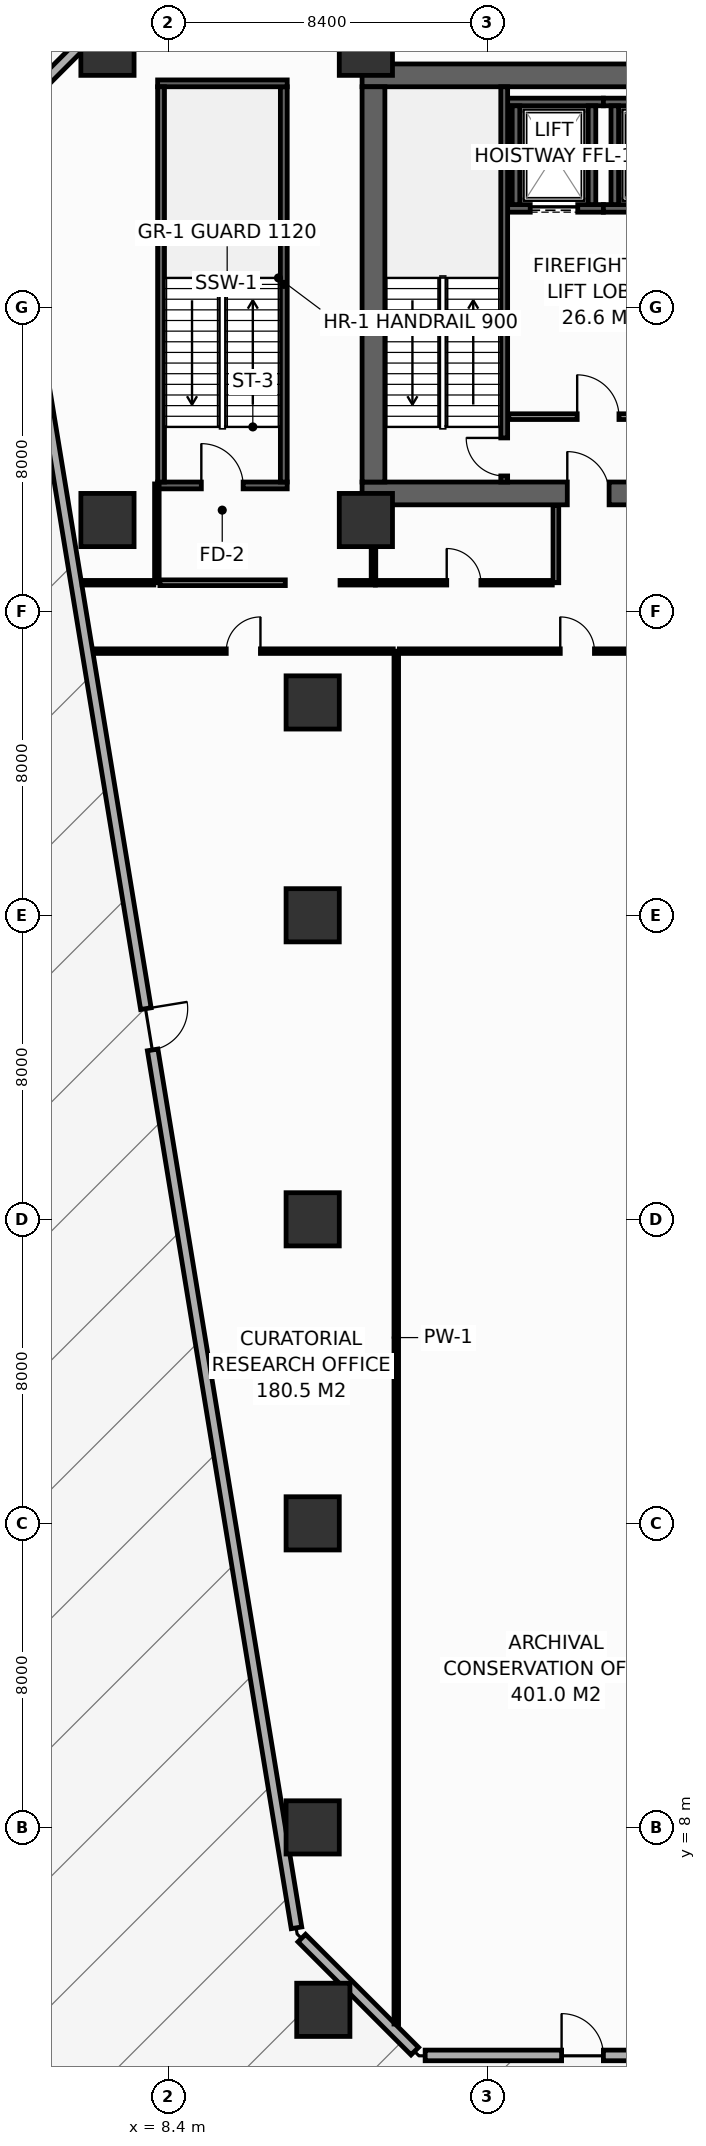
"""IFC4 building model, lengths in metres.
Left out: names, types, materials, properties, quantities, classifications, styles, units other than length and angle.
Written with IfcOpenShell. Run it as: python <this file> out.ifc"""

import sys

from ifc_helpers import new_model, si_unit, direction, frame, frame_2d, origin, origin_2d, place, context, subcontext, project, spatial, rectangle, hollow_rectangle, extrude, element, fill, save


model = new_model("IFC4")
c1 = context("Model", 3, precision=1e-05, world=origin(), true_north=direction((0.0, 1.0)))
c2 = subcontext(c1, "Body", "Model", "MODEL_VIEW")
j1 = project(units=[si_unit("LENGTHUNIT", "METRE"), si_unit("PLANEANGLEUNIT", "RADIAN")], contexts=[c1])
p1 = place(None, origin())
s1 = spatial("IfcSite", under=j1, at=p1, CompositionType="ELEMENT")
p2 = place(p1, origin())
s2 = spatial("IfcBuilding", under=s1, at=p2, CompositionType="ELEMENT")
p3 = place(p2, frame((0.0, 0.0, 27.6)))
s3 = spatial("IfcBuildingStorey", under=s2, at=p3, CompositionType="ELEMENT", Elevation=27.6)
p4 = place(p3, frame((13.5, 43.1, 0.0), z_axis=(0.0, 0.0, 1.0), x_axis=(1.0, 0.0, 0.0)))
e1 = element("IfcWall", 1, at=p4, inside=s3, PredefinedType="SHEAR", context=c2, shape_type="SweptSolid", body=[
    extrude(rectangle(XDim=32.9, YDim=0.6, at=frame_2d((16.45, 0.0))), origin(), (0.0, 0.0, 1.0), 5.15),
])
p5 = place(p4, frame((5.4, 0.0, 0.0)))
e2 = element("IfcOpeningElement", 2, at=p5, cuts=e1, PredefinedType="OPENING", context=c2, shape_type="SweptSolid", body=[
    extrude(rectangle(XDim=1.1, YDim=2.15, at=frame_2d((0.55, 1.075))), frame((0.0, 0.31, 0.0), z_axis=(0.0, -1.0, 0.0), x_axis=(1.0, 0.0, 0.0)), (0.0, 0.0, 1.0), 0.62),
])
p6 = place(p4, frame((25.6, 0.0, 0.0)))
e3 = element("IfcOpeningElement", 3, at=p6, cuts=e1, PredefinedType="OPENING", context=c2, shape_type="SweptSolid", body=[
    extrude(rectangle(XDim=1.1, YDim=2.15, at=frame_2d((0.55, 1.075))), frame((0.0, 0.31, 0.0), z_axis=(0.0, -1.0, 0.0), x_axis=(1.0, 0.0, 0.0)), (0.0, 0.0, 1.0), 0.62),
])
p7 = place(p3, frame((13.5, 54.1, 0.0), z_axis=(0.0, 0.0, 1.0), x_axis=(1.0, 0.0, 0.0)))
e4 = element("IfcWall", 4, at=p7, inside=s3, PredefinedType="SHEAR", context=c2, shape_type="SweptSolid", body=[
    extrude(rectangle(XDim=32.9, YDim=0.6, at=frame_2d((16.45, 0.0))), origin(), (0.0, 0.0, 1.0), 5.15),
])
p8 = place(p3, frame((13.8, 43.4, 0.0), z_axis=(0.0, 0.0, 1.0), x_axis=(0.0, 1.0, 0.0)))
e5 = element("IfcWall", 5, at=p8, inside=s3, PredefinedType="SHEAR", context=c2, shape_type="SweptSolid", body=[
    extrude(rectangle(XDim=10.4, YDim=0.6, at=frame_2d((5.2, 0.0))), origin(), (0.0, 0.0, 1.0), 5.15),
])
for number, where, z_axis, x_axis in (
    (6, (6.8, 54.8, 0.0), (0.0, 0.0, 1.0), (1.0, 0.0, 0.0)),
    (7, (13.6, 54.8, 0.0), (0.0, 0.0, 1.0), (1.0, 0.0, 0.0)),
    (8, (6.8, 42.4, 0.0), (0.0, 0.0, 1.0), (1.0, 0.0, 0.0)),
    (9, (13.6, 42.4, 0.0), (0.0, 0.0, 1.0), (1.0, 0.0, 0.0)),
    (10, (12.48, 3.2, 0.0), (0.0, 0.0, 1.0), (1.0, 0.0, 0.0)),
    (11, (12.2, 8.0, 0.0), (0.0, 0.0, 1.0), (1.0, 0.0, 0.0)),
    (12, (12.2, 16.0, 0.0), (0.0, 0.0, 1.0), (1.0, 0.0, 0.0)),
    (13, (12.2, 24.0, 0.0), (0.0, 0.0, 1.0), (1.0, 0.0, 0.0)),
    (14, (12.2, 32.0, 0.0), (0.0, 0.0, 1.0), (1.0, 0.0, 0.0)),
    (15, (12.2, 37.6, 0.0), (0.0, 0.0, 1.0), (1.0, 0.0, 0.0)),
):
    element("IfcColumn", number, at=place(p3, frame(where, z_axis=z_axis, x_axis=x_axis)), inside=s3, PredefinedType="COLUMN", context=c2, shape_type="SweptSolid", body=[
        extrude(hollow_rectangle(XDim=1.4, YDim=1.4, WallThickness=0.065, at=origin_2d()), origin(), (0.0, 0.0, 1.0), 5.4),
    ])
p9 = place(p3, frame((17.33, 50.6, 0.0), z_axis=(0.0, 0.0, 1.0), x_axis=(1.0, 0.0, 0.0)))
e16 = element("IfcWall", 16, at=p9, inside=s3, PredefinedType="SHEAR", context=c2, shape_type="SweptSolid", body=[
    extrude(rectangle(XDim=2.52, YDim=0.2, at=frame_2d((1.26, 0.0))), origin(), (0.0, 0.0, 1.0), 5.15),
])
p10 = place(p9, frame((0.595, 0.0, 0.0)))
e17 = element("IfcOpeningElement", 17, at=p10, cuts=e16, PredefinedType="OPENING", context=c2, shape_type="SweptSolid", body=[
    extrude(rectangle(XDim=1.25, YDim=2.3, at=frame_2d((0.625, 1.15))), frame((0.0, 0.11, 0.0), z_axis=(0.0, -1.0, 0.0), x_axis=(1.0, 0.0, 0.0)), (0.0, 0.0, 1.0), 0.22),
])
p11 = place(p3, frame((17.33, 53.4, 0.0), z_axis=(0.0, 0.0, 1.0), x_axis=(1.0, 0.0, 0.0)))
e18 = element("IfcWall", 18, at=p11, inside=s3, PredefinedType="SHEAR", context=c2, shape_type="SweptSolid", body=[
    extrude(rectangle(XDim=2.52, YDim=0.2, at=frame_2d((1.26, 0.0))), origin(), (0.0, 0.0, 1.0), 5.15),
])
for number, where, z_axis, x_axis in (
    (19, (17.55, 50.7, 0.0), (0.0, 0.0, 1.0), (0.0, 1.0, 0.0)),
    (20, (19.55, 50.7, 0.0), (0.0, 0.0, 1.0), (0.0, 1.0, 0.0)),
):
    element("IfcWall", number, at=place(p3, frame(where, z_axis=z_axis, x_axis=x_axis)), inside=s3, PredefinedType="SHEAR", context=c2, shape_type="SweptSolid", body=[
        extrude(rectangle(XDim=2.6, YDim=0.2, at=frame_2d((1.3, 0.0))), origin(), (0.0, 0.0, 1.0), 5.15),
    ])
p12 = place(p3, frame((19.85, 50.6, 0.0), z_axis=(0.0, 0.0, 1.0), x_axis=(1.0, 0.0, 0.0)))
e21 = element("IfcWall", 21, at=p12, inside=s3, PredefinedType="SHEAR", context=c2, shape_type="SweptSolid", body=[
    extrude(rectangle(XDim=2.65, YDim=0.2, at=frame_2d((1.325, 0.0))), origin(), (0.0, 0.0, 1.0), 5.15),
])
p13 = place(p12, frame((0.675, 0.0, 0.0)))
e22 = element("IfcOpeningElement", 22, at=p13, cuts=e21, PredefinedType="OPENING", context=c2, shape_type="SweptSolid", body=[
    extrude(rectangle(XDim=1.25, YDim=2.3, at=frame_2d((0.625, 1.15))), frame((0.0, 0.11, 0.0), z_axis=(0.0, -1.0, 0.0), x_axis=(1.0, 0.0, 0.0)), (0.0, 0.0, 1.0), 0.22),
])
p14 = place(p3, frame((19.85, 53.4, 0.0), z_axis=(0.0, 0.0, 1.0), x_axis=(1.0, 0.0, 0.0)))
e23 = element("IfcWall", 23, at=p14, inside=s3, PredefinedType="SHEAR", context=c2, shape_type="SweptSolid", body=[
    extrude(rectangle(XDim=2.65, YDim=0.2, at=frame_2d((1.325, 0.0))), origin(), (0.0, 0.0, 1.0), 5.15),
])
p15 = place(p3, frame((20.15, 50.7, 0.0), z_axis=(0.0, 0.0, 1.0), x_axis=(0.0, 1.0, 0.0)))
e24 = element("IfcWall", 24, at=p15, inside=s3, PredefinedType="SHEAR", context=c2, shape_type="SweptSolid", body=[
    extrude(rectangle(XDim=2.6, YDim=0.2, at=frame_2d((1.3, 0.0))), origin(), (0.0, 0.0, 1.0), 5.15),
])
p16 = place(p3, frame((17.24, 43.4, 0.0), z_axis=(0.0, 0.0, 1.0), x_axis=(0.0, 1.0, 0.0)))
e25 = element("IfcWall", 25, at=p16, inside=s3, PredefinedType="SHEAR", context=c2, shape_type="SweptSolid", body=[
    extrude(rectangle(XDim=10.4, YDim=0.18, at=frame_2d((5.2, 0.0))), origin(), (0.0, 0.0, 1.0), 5.15),
])
p17 = place(p16, frame((0.16, 0.0, 0.0)))
e26 = element("IfcOpeningElement", 26, at=p17, cuts=e25, PredefinedType="OPENING", context=c2, shape_type="SweptSolid", body=[
    extrude(rectangle(XDim=1.0, YDim=2.15, at=frame_2d((0.5, 1.075))), frame((0.0, 0.1, 0.0), z_axis=(0.0, -1.0, 0.0), x_axis=(1.0, 0.0, 0.0)), (0.0, 0.0, 1.0), 0.2),
])
p18 = place(p3, frame((8.12, 43.31, 0.0), z_axis=(0.0, 0.0, 1.0), x_axis=(1.0, 0.0, 0.0)))
e27 = element("IfcWall", 27, at=p18, inside=s3, PredefinedType="SHEAR", context=c2, shape_type="SweptSolid", body=[
    extrude(rectangle(XDim=3.41, YDim=0.18, at=frame_2d((1.705, 0.0))), origin(), (0.0, 0.0, 1.0), 5.15),
])
p19 = place(p18, frame((1.15, 0.0, 0.0)))
e28 = element("IfcOpeningElement", 28, at=p19, cuts=e27, PredefinedType="OPENING", context=c2, shape_type="SweptSolid", body=[
    extrude(rectangle(XDim=1.1, YDim=2.15, at=frame_2d((0.55, 1.075))), frame((0.0, 0.1, 0.0), z_axis=(0.0, -1.0, 0.0), x_axis=(1.0, 0.0, 0.0)), (0.0, 0.0, 1.0), 0.2),
])
p20 = place(p3, frame((11.44, 43.4, 0.0), z_axis=(0.0, 0.0, 1.0), x_axis=(0.0, 1.0, 0.0)))
e29 = element("IfcWall", 29, at=p20, inside=s3, PredefinedType="SHEAR", context=c2, shape_type="SweptSolid", body=[
    extrude(rectangle(XDim=10.4, YDim=0.18, at=frame_2d((5.2, 0.0))), origin(), (0.0, 0.0, 1.0), 5.15),
])
p21 = place(p3, frame((11.53, 53.89, 0.0), z_axis=(0.0, 0.0, 1.0), x_axis=(-1.0, 0.0, 0.0)))
e30 = element("IfcWall", 30, at=p21, inside=s3, PredefinedType="SHEAR", context=c2, shape_type="SweptSolid", body=[
    extrude(rectangle(XDim=3.41, YDim=0.18, at=frame_2d((1.705, 0.0))), origin(), (0.0, 0.0, 1.0), 5.15),
])
p22 = place(p3, frame((8.21, 53.8, 0.0), z_axis=(0.0, 0.0, 1.0), x_axis=(0.0, -1.0, 0.0)))
e31 = element("IfcWall", 31, at=p22, inside=s3, PredefinedType="SHEAR", context=c2, shape_type="SweptSolid", body=[
    extrude(rectangle(XDim=10.4, YDim=0.18, at=frame_2d((5.2, 0.0))), origin(), (0.0, 0.0, 1.0), 5.15),
])
p23 = place(p3, frame((17.36, 45.12, 0.0), z_axis=(0.0, 0.0, 1.0), x_axis=(1.0, 0.0, 0.0)))
e32 = element("IfcWall", 32, at=p23, inside=s3, PredefinedType="PARTITIONING", context=c2, shape_type="SweptSolid", body=[
    extrude(rectangle(XDim=5.14, YDim=0.15, at=frame_2d((2.57, 0.0))), origin(), (0.0, 0.0, 1.0), 5.15),
])
p24 = place(p23, frame((1.8, 0.0, 0.0)))
e33 = element("IfcOpeningElement", 33, at=p24, cuts=e32, PredefinedType="OPENING", context=c2, shape_type="SweptSolid", body=[
    extrude(rectangle(XDim=1.1, YDim=2.15, at=frame_2d((0.55, 1.075))), frame((0.0, 0.085, 0.0), z_axis=(0.0, -1.0, 0.0), x_axis=(1.0, 0.0, 0.0)), (0.0, 0.0, 1.0), 0.17),
])
p25 = place(p3, frame((11.913, 5.087, 0.0), z_axis=(0.0, 0.0, 1.0), x_axis=(0.707106781187, -0.707106781187, 0.0)))
e34 = element("IfcWall", 34, at=p25, inside=s3, PredefinedType="STANDARD", context=c2, shape_type="SweptSolid", body=[
    extrude(rectangle(XDim=4.206, YDim=0.28, at=frame_2d((2.103, 0.0))), origin(), (0.0, 0.0, 1.0), 5.15),
])
p26 = place(p3, frame((15.16, 2.0, 0.0), z_axis=(0.0, 0.0, 1.0), x_axis=(1.0, 0.0, 0.0)))
e35 = element("IfcWall", 35, at=p26, inside=s3, PredefinedType="STANDARD", context=c2, shape_type="SweptSolid", body=[
    extrude(rectangle(XDim=8.28, YDim=0.28, at=frame_2d((4.14, 0.0))), origin(), (0.0, 0.0, 1.0), 5.15),
])
p27 = place(p26, frame((3.59, 0.0, 0.0)))
e36 = element("IfcOpeningElement", 36, at=p27, cuts=e35, PredefinedType="OPENING", context=c2, shape_type="SweptSolid", body=[
    extrude(rectangle(XDim=1.1, YDim=2.2, at=frame_2d((0.55, 1.1))), frame((0.0, 0.15, 0.0), z_axis=(0.0, -1.0, 0.0), x_axis=(1.0, 0.0, 0.0)), (0.0, 0.0, 1.0), 0.3),
])
p28 = place(p3, frame((7.087, 55.887, 0.0), z_axis=(0.0, 0.0, 1.0), x_axis=(-0.707106781187, -0.707106781187, 0.0)))
e37 = element("IfcWall", 37, at=p28, inside=s3, PredefinedType="STANDARD", context=c2, shape_type="SweptSolid", body=[
    extrude(rectangle(XDim=4.206, YDim=0.28, at=frame_2d((2.103, 0.0))), origin(), (0.0, 0.0, 1.0), 5.15),
])
p29 = place(p3, frame((4.026, 52.642, 0.0), z_axis=(0.0, 0.0, 1.0), x_axis=(0.161709707857, -0.986838370953, 0.0)))
e38 = element("IfcWall", 38, at=p29, inside=s3, PredefinedType="STANDARD", context=c2, shape_type="SweptSolid", body=[
    extrude(rectangle(XDim=47.915, YDim=0.28, at=frame_2d((23.958, 0.0))), origin(), (0.0, 0.0, 1.0), 5.15),
])
p30 = place(p29, frame((23.407, 0.0, 0.0)))
e39 = element("IfcOpeningElement", 39, at=p30, cuts=e38, PredefinedType="OPENING", context=c2, shape_type="SweptSolid", body=[
    extrude(rectangle(XDim=1.1, YDim=2.2, at=frame_2d((0.55, 1.1))), frame((0.0, 0.15, 0.0), z_axis=(0.0, -1.0, 0.0), x_axis=(1.0, 0.0, 0.0)), (0.0, 0.0, 1.0), 0.3),
])
p31 = place(p3, frame((12.92, 40.75, 0.0), z_axis=(0.0, 0.0, 1.0), x_axis=(1.0, 0.0, 0.0)))
e40 = element("IfcWall", 40, at=p31, inside=s3, PredefinedType="PARTITIONING", context=c2, shape_type="SweptSolid", body=[
    extrude(rectangle(XDim=0.93, YDim=0.12, at=frame_2d((0.465, 0.0))), origin(), (0.0, 0.0, 1.0), 5.15),
])
p32 = place(p3, frame((13.8, 40.83, 0.0), z_axis=(0.0, 0.0, 1.0), x_axis=(0.0, 1.0, 0.0)))
e41 = element("IfcWall", 41, at=p32, inside=s3, PredefinedType="PARTITIONING", context=c2, shape_type="SweptSolid", body=[
    extrude(rectangle(XDim=1.95, YDim=0.12, at=frame_2d((0.975, 0.0))), origin(), (0.0, 0.0, 1.0), 5.15),
])
p33 = place(p3, frame((8.1, 40.75, 0.0), z_axis=(0.0, 0.0, 1.0), x_axis=(0.0, 1.0, 0.0)))
e42 = element("IfcWall", 42, at=p33, inside=s3, PredefinedType="PARTITIONING", context=c2, shape_type="SweptSolid", body=[
    extrude(rectangle(XDim=2.6, YDim=0.12, at=frame_2d((1.3, 0.0))), origin(), (0.0, 0.0, 1.0), 4.235),
])
p34 = place(p3, frame((8.18, 40.75, 0.0), z_axis=(0.0, 0.0, 1.0), x_axis=(1.0, 0.0, 0.0)))
e43 = element("IfcWall", 43, at=p34, inside=s3, PredefinedType="PARTITIONING", context=c2, shape_type="SweptSolid", body=[
    extrude(rectangle(XDim=3.3, YDim=0.15, at=frame_2d((1.65, 0.0))), origin(), (0.0, 0.0, 1.0), 4.235),
])
p35 = place(p3, frame((6.137, 40.75, 0.0), z_axis=(0.0, 0.0, 1.0), x_axis=(1.0, 0.0, 0.0)))
e44 = element("IfcWall", 44, at=p35, inside=s3, PredefinedType="PARTITIONING", context=c2, shape_type="SweptSolid", body=[
    extrude(rectangle(XDim=1.883, YDim=0.12, at=frame_2d((0.942, 0.0))), origin(), (0.0, 0.0, 1.0), 5.15),
])
p36 = place(p3, frame((18.6, 40.75, 0.0), z_axis=(0.0, 0.0, 1.0), x_axis=(0.0, 1.0, 0.0)))
e45 = element("IfcWall", 45, at=p36, inside=s3, PredefinedType="PARTITIONING", context=c2, shape_type="SweptSolid", body=[
    extrude(rectangle(XDim=2.03, YDim=0.15, at=frame_2d((1.015, 0.0))), origin(), (0.0, 0.0, 1.0), 5.15),
])
p37 = place(p3, frame((13.85, 40.75, 0.0), z_axis=(0.0, 0.0, 1.0), x_axis=(1.0, 0.0, 0.0)))
e46 = element("IfcWall", 46, at=p37, inside=s3, PredefinedType="PARTITIONING", context=c2, shape_type="SweptSolid", body=[
    extrude(rectangle(XDim=4.655, YDim=0.12, at=frame_2d((2.327, 0.0))), origin(), (0.0, 0.0, 1.0), 5.15),
])
p38 = place(p37, frame((1.877, 0.0, 0.0)))
e47 = element("IfcOpeningElement", 47, at=p38, cuts=e46, PredefinedType="OPENING", context=c2, shape_type="SweptSolid", body=[
    extrude(rectangle(XDim=0.9, YDim=2.1, at=frame_2d((0.45, 1.05))), frame((0.0, 0.07, 0.0), z_axis=(0.0, -1.0, 0.0), x_axis=(1.0, 0.0, 0.0)), (0.0, 0.0, 1.0), 0.14),
])
p39 = place(p3, frame((14.4, 2.826, 0.0), z_axis=(0.0, 0.0, 1.0), x_axis=(0.0, 1.0, 0.0)))
e48 = element("IfcWall", 48, at=p39, inside=s3, PredefinedType="PARTITIONING", context=c2, shape_type="SweptSolid", body=[
    extrude(rectangle(XDim=36.124, YDim=0.12, at=frame_2d((18.062, 0.0))), origin(), (0.0, 0.0, 1.0), 4.235),
])
p40 = place(p3, frame((6.432, 38.95, 0.0), z_axis=(0.0, 0.0, 1.0), x_axis=(1.0, 0.0, 0.0)))
e49 = element("IfcWall", 49, at=p40, inside=s3, PredefinedType="PARTITIONING", context=c2, shape_type="SweptSolid", body=[
    extrude(rectangle(XDim=7.888, YDim=0.12, at=frame_2d((3.944, 0.0))), origin(), (0.0, 0.0, 1.0), 4.235),
])
p41 = place(p40, frame((3.494, 0.0, 0.0)))
e50 = element("IfcOpeningElement", 50, at=p41, cuts=e49, PredefinedType="OPENING", context=c2, shape_type="SweptSolid", body=[
    extrude(rectangle(XDim=0.9, YDim=2.1, at=frame_2d((0.45, 1.05))), frame((0.0, 0.07, 0.0), z_axis=(0.0, -1.0, 0.0), x_axis=(1.0, 0.0, 0.0)), (0.0, 0.0, 1.0), 0.14),
])
p42 = place(p3, frame((14.48, 38.95, 0.0), z_axis=(0.0, 0.0, 1.0), x_axis=(1.0, 0.0, 0.0)))
e51 = element("IfcWall", 51, at=p42, inside=s3, PredefinedType="PARTITIONING", context=c2, shape_type="SweptSolid", body=[
    extrude(rectangle(XDim=9.37, YDim=0.12, at=frame_2d((4.685, 0.0))), origin(), (0.0, 0.0, 1.0), 4.235),
])
p43 = place(p42, frame((4.235, 0.0, 0.0)))
e52 = element("IfcOpeningElement", 52, at=p43, cuts=e51, PredefinedType="OPENING", context=c2, shape_type="SweptSolid", body=[
    extrude(rectangle(XDim=0.9, YDim=2.1, at=frame_2d((0.45, 1.05))), frame((0.0, 0.07, 0.0), z_axis=(0.0, -1.0, 0.0), x_axis=(1.0, 0.0, 0.0)), (0.0, 0.0, 1.0), 0.14),
])
p44 = place(p10, origin())
e53 = element("IfcDoor", 53, at=p44, inside=s3, OperationType="SLIDING_TO_LEFT", PredefinedType="DOOR", context=c2, shape_type="SweptSolid", body=[
    extrude(rectangle(XDim=1.25, YDim=2.3, at=frame_2d((0.625, 1.15))), frame((0.0, 0.025, 0.0), z_axis=(0.0, -1.0, 0.0), x_axis=(1.0, 0.0, 0.0)), (0.0, 0.0, 1.0), 0.05),
])
fill(e17, e53)
p45 = place(p17, origin())
e54 = element("IfcDoor", 54, at=p45, inside=s3, OperationType="SINGLE_SWING_RIGHT", PredefinedType="DOOR", context=c2, shape_type="SweptSolid", body=[
    extrude(rectangle(XDim=1.0, YDim=2.15, at=frame_2d((0.5, 1.075))), frame((0.0, 0.025, 0.0), z_axis=(0.0, -1.0, 0.0), x_axis=(1.0, 0.0, 0.0)), (0.0, 0.0, 1.0), 0.05),
])
fill(e26, e54)
p46 = place(p19, origin())
e55 = element("IfcDoor", 55, at=p46, inside=s3, OperationType="SINGLE_SWING_LEFT", PredefinedType="DOOR", context=c2, shape_type="SweptSolid", body=[
    extrude(rectangle(XDim=1.1, YDim=2.15, at=frame_2d((0.55, 1.075))), frame((0.0, 0.025, 0.0), z_axis=(0.0, -1.0, 0.0), x_axis=(1.0, 0.0, 0.0)), (0.0, 0.0, 1.0), 0.05),
])
fill(e28, e55)
p47 = place(p24, origin())
e56 = element("IfcDoor", 56, at=p47, inside=s3, OperationType="SINGLE_SWING_LEFT", PredefinedType="DOOR", context=c2, shape_type="SweptSolid", body=[
    extrude(rectangle(XDim=1.1, YDim=2.15, at=frame_2d((0.55, 1.075))), frame((0.0, 0.025, 0.0), z_axis=(0.0, -1.0, 0.0), x_axis=(1.0, 0.0, 0.0)), (0.0, 0.0, 1.0), 0.05),
])
fill(e33, e56)
p48 = place(p5, origin())
e57 = element("IfcDoor", 57, at=p48, inside=s3, OperationType="SINGLE_SWING_LEFT", PredefinedType="DOOR", context=c2, shape_type="SweptSolid", body=[
    extrude(rectangle(XDim=1.1, YDim=2.15, at=frame_2d((0.55, 1.075))), frame((0.0, 0.025, 0.0), z_axis=(0.0, -1.0, 0.0), x_axis=(1.0, 0.0, 0.0)), (0.0, 0.0, 1.0), 0.05),
])
fill(e2, e57)
p49 = place(p27, origin())
e58 = element("IfcDoor", 58, at=p49, inside=s3, OperationType="SINGLE_SWING_LEFT", PredefinedType="DOOR", context=c2, shape_type="SweptSolid", body=[
    extrude(rectangle(XDim=1.1, YDim=2.2, at=frame_2d((0.55, 1.1))), frame((0.0, 0.025, 0.0), z_axis=(0.0, -1.0, 0.0), x_axis=(1.0, 0.0, 0.0)), (0.0, 0.0, 1.0), 0.05),
])
fill(e36, e58)
p50 = place(p30, origin())
e59 = element("IfcDoor", 59, at=p50, inside=s3, OperationType="SINGLE_SWING_LEFT", PredefinedType="DOOR", context=c2, shape_type="SweptSolid", body=[
    extrude(rectangle(XDim=1.1, YDim=2.2, at=frame_2d((0.55, 1.1))), frame((0.0, 0.025, 0.0), z_axis=(0.0, -1.0, 0.0), x_axis=(1.0, 0.0, 0.0)), (0.0, 0.0, 1.0), 0.05),
])
fill(e39, e59)
p51 = place(p38, origin())
e60 = element("IfcDoor", 60, at=p51, inside=s3, OperationType="SINGLE_SWING_LEFT", PredefinedType="DOOR", context=c2, shape_type="SweptSolid", body=[
    extrude(rectangle(XDim=0.9, YDim=2.1, at=frame_2d((0.45, 1.05))), frame((0.0, 0.025, 0.0), z_axis=(0.0, -1.0, 0.0), x_axis=(1.0, 0.0, 0.0)), (0.0, 0.0, 1.0), 0.05),
])
fill(e47, e60)
p52 = place(p41, origin())
e61 = element("IfcDoor", 61, at=p52, inside=s3, OperationType="SINGLE_SWING_RIGHT", PredefinedType="DOOR", context=c2, shape_type="SweptSolid", body=[
    extrude(rectangle(XDim=0.9, YDim=2.1, at=frame_2d((0.45, 1.05))), frame((0.0, 0.025, 0.0), z_axis=(0.0, -1.0, 0.0), x_axis=(1.0, 0.0, 0.0)), (0.0, 0.0, 1.0), 0.05),
])
fill(e50, e61)
p53 = place(p43, origin())
e62 = element("IfcDoor", 62, at=p53, inside=s3, OperationType="SINGLE_SWING_LEFT", PredefinedType="DOOR", context=c2, shape_type="SweptSolid", body=[
    extrude(rectangle(XDim=0.9, YDim=2.1, at=frame_2d((0.45, 1.05))), frame((0.0, 0.025, 0.0), z_axis=(0.0, -1.0, 0.0), x_axis=(1.0, 0.0, 0.0)), (0.0, 0.0, 1.0), 0.05),
])
fill(e52, e62)
save(model, sys.argv[1])
